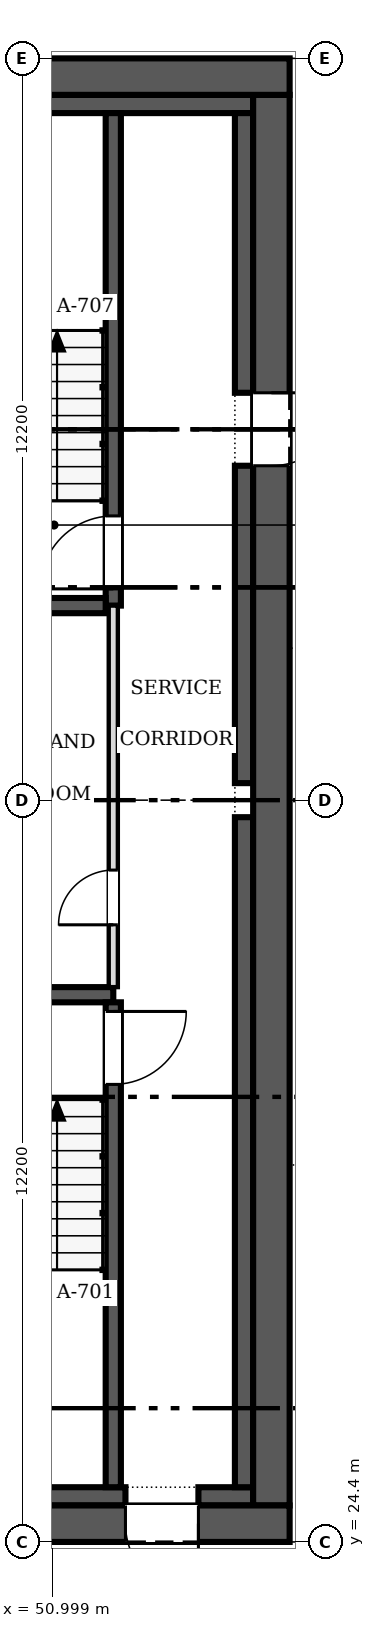
"""IFC4 building model, lengths in metres.
Left out: names, types, materials, properties, quantities, classifications, styles, units other than length and angle.
Written with IfcOpenShell. Run it as: python <this file> out.ifc"""

import sys

from ifc_helpers import new_model, si_unit, direction, frame, frame_2d, origin, place, context, subcontext, project, spatial, rectangle, extrude, source, transform, mapped, element, fill, save


model = new_model("IFC4")
c1 = context("Model", 3, precision=1e-05, world=origin(), true_north=direction((0.0, 1.0)))
c2 = subcontext(c1, "Body", "Model", "MODEL_VIEW")
j1 = project(units=[si_unit("LENGTHUNIT", "METRE"), si_unit("PLANEANGLEUNIT", "RADIAN")], contexts=[c1])
p1 = place(None, origin())
s1 = spatial("IfcSite", under=j1, at=p1, CompositionType="ELEMENT")
p2 = place(p1, origin())
s2 = spatial("IfcBuilding", under=s1, at=p2, CompositionType="ELEMENT")
p3 = place(p2, frame((0.0, 0.0, 189.6)))
s3 = spatial("IfcBuildingStorey", under=s2, at=p3, CompositionType="ELEMENT", Elevation=189.6)
p4 = place(p3, frame((54.9, 24.7, 0.0), z_axis=(0.0, 0.0, 1.0), x_axis=(-1.0, 0.0, 0.0)))
e1 = element("IfcWall", 1, at=p4, inside=s3, PredefinedType="SHEAR", context=c2, shape_type="SweptSolid", body=[
    extrude(rectangle(XDim=24.4, YDim=0.6, at=frame_2d((12.2, 0.0))), origin(), (0.0, 0.0, 1.0), 3.8),
])
m1 = source(origin(), c2, "Body", "SweptSolid", [
    extrude(rectangle(XDim=1.2, YDim=2.1, at=frame_2d((0.6, 1.05))), frame((0.0, 0.31, 0.0), z_axis=(0.0, -1.0, 0.0), x_axis=(1.0, 0.0, 0.0)), (0.0, 0.0, 1.0), 0.62),
])
p5 = place(p4, frame((1.5, 0.0, 0.0)))
e2 = element("IfcOpeningElement", 2, at=p5, cuts=e1, PredefinedType="OPENING", context=c2, shape_type="MappedRepresentation", body=[
    mapped(m1, transform((0.0, 0.0, 0.0), scale=1.0)),
])
p6 = place(p3, frame((30.5, 48.5, 0.0), z_axis=(0.0, 0.0, 1.0), x_axis=(1.0, 0.0, 0.0)))
e3 = element("IfcWall", 3, at=p6, inside=s3, PredefinedType="SHEAR", context=c2, shape_type="SweptSolid", body=[
    extrude(rectangle(XDim=24.4, YDim=0.6, at=frame_2d((12.2, 0.0))), origin(), (0.0, 0.0, 1.0), 3.8),
])
p7 = place(p3, frame((54.6, 48.2, 0.0), z_axis=(0.0, 0.0, 1.0), x_axis=(0.0, -1.0, 0.0)))
e4 = element("IfcWall", 4, at=p7, inside=s3, PredefinedType="SHEAR", context=c2, shape_type="SweptSolid", body=[
    extrude(rectangle(XDim=23.2, YDim=0.6, at=frame_2d((11.6, 0.0))), origin(), (0.0, 0.0, 1.0), 3.8),
])
p8 = place(p7, frame((4.9, 0.0, 0.0)))
e5 = element("IfcOpeningElement", 5, at=p8, cuts=e4, PredefinedType="OPENING", context=c2, shape_type="MappedRepresentation", body=[
    mapped(m1, transform((0.0, 0.0, 0.0), scale=1.0)),
])
p9 = place(p3, frame((31.1, 25.15, 0.0), z_axis=(0.0, 0.0, 1.0), x_axis=(1.0, 0.0, 0.0)))
e6 = element("IfcWall", 6, at=p9, inside=s3, PredefinedType="SOLIDWALL", context=c2, shape_type="SweptSolid", body=[
    extrude(rectangle(XDim=21.1, YDim=0.3, at=frame_2d((10.55, 0.0))), origin(), (0.0, 0.0, 1.0), 3.8),
])
p10 = place(p3, frame((53.4, 25.15, 0.0), z_axis=(0.0, 0.0, 1.0), x_axis=(1.0, 0.0, 0.0)))
e7 = element("IfcWall", 7, at=p10, inside=s3, PredefinedType="SOLIDWALL", context=c2, shape_type="SweptSolid", body=[
    extrude(rectangle(XDim=0.9, YDim=0.3, at=frame_2d((0.45, 0.0))), origin(), (0.0, 0.0, 1.0), 3.8),
])
p11 = place(p3, frame((31.1, 48.05, 0.0), z_axis=(0.0, 0.0, 1.0), x_axis=(1.0, 0.0, 0.0)))
e8 = element("IfcWall", 8, at=p11, inside=s3, PredefinedType="SOLIDWALL", context=c2, shape_type="SweptSolid", body=[
    extrude(rectangle(XDim=23.2, YDim=0.3, at=frame_2d((11.6, 0.0))), origin(), (0.0, 0.0, 1.0), 3.8),
])
p12 = place(p3, frame((54.15, 25.3, 0.0), z_axis=(0.0, 0.0, 1.0), x_axis=(0.0, 1.0, 0.0)))
e9 = element("IfcWall", 9, at=p12, inside=s3, PredefinedType="SOLIDWALL", context=c2, shape_type="SweptSolid", body=[
    extrude(rectangle(XDim=11.02, YDim=0.3, at=frame_2d((5.51, 0.0))), origin(), (0.0, 0.0, 1.0), 3.8),
])
p13 = place(p3, frame((54.15, 36.88, 0.0), z_axis=(0.0, 0.0, 1.0), x_axis=(0.0, 1.0, 0.0)))
e10 = element("IfcWall", 10, at=p13, inside=s3, PredefinedType="SOLIDWALL", context=c2, shape_type="SweptSolid", body=[
    extrude(rectangle(XDim=5.22, YDim=0.3, at=frame_2d((2.61, 0.0))), origin(), (0.0, 0.0, 1.0), 3.8),
])
p14 = place(p3, frame((54.15, 43.3, 0.0), z_axis=(0.0, 0.0, 1.0), x_axis=(0.0, 1.0, 0.0)))
e11 = element("IfcWall", 11, at=p14, inside=s3, PredefinedType="SOLIDWALL", context=c2, shape_type="SweptSolid", body=[
    extrude(rectangle(XDim=4.6, YDim=0.3, at=frame_2d((2.3, 0.0))), origin(), (0.0, 0.0, 1.0), 3.8),
])
p15 = place(p3, frame((48.475, 33.4, 0.0), z_axis=(0.0, 0.0, 1.0), x_axis=(1.0, 0.0, 0.0)))
e12 = element("IfcWall", 12, at=p15, inside=s3, PredefinedType="SOLIDWALL", context=c2, shape_type="SweptSolid", body=[
    extrude(rectangle(XDim=3.525, YDim=0.25, at=frame_2d((1.762, 0.0))), origin(), (0.0, 0.0, 1.0), 3.8),
])
p16 = place(p3, frame((52.0, 25.3, 0.0), z_axis=(0.0, 0.0, 1.0), x_axis=(0.0, 1.0, 0.0)))
e13 = element("IfcWall", 13, at=p16, inside=s3, PredefinedType="SOLIDWALL", context=c2, shape_type="SweptSolid", body=[
    extrude(rectangle(XDim=7.975, YDim=0.25, at=frame_2d((3.987, 0.0))), origin(), (0.0, 0.0, 1.0), 3.8),
])
m2 = source(origin(), c2, "Body", "SweptSolid", [
    extrude(rectangle(XDim=1.2, YDim=2.1, at=frame_2d((0.6, 1.05))), frame((0.0, 0.135, 0.0), z_axis=(0.0, -1.0, 0.0), x_axis=(1.0, 0.0, 0.0)), (0.0, 0.0, 1.0), 0.27),
])
p17 = place(p16, frame((6.625, 0.0, 0.0)))
e14 = element("IfcOpeningElement", 14, at=p17, cuts=e13, PredefinedType="OPENING", context=c2, shape_type="MappedRepresentation", body=[
    mapped(m2, transform((0.0, 0.0, 0.0), scale=1.0)),
])
p18 = place(p3, frame((52.0, 39.8, 0.0), z_axis=(0.0, 0.0, 1.0), x_axis=(0.0, 1.0, 0.0)))
e15 = element("IfcWall", 15, at=p18, inside=s3, PredefinedType="SOLIDWALL", context=c2, shape_type="SweptSolid", body=[
    extrude(rectangle(XDim=8.1, YDim=0.25, at=frame_2d((4.05, 0.0))), origin(), (0.0, 0.0, 1.0), 3.8),
])
p19 = place(p18, frame((0.275, 0.0, 0.0)))
e16 = element("IfcOpeningElement", 16, at=p19, cuts=e15, PredefinedType="OPENING", context=c2, shape_type="MappedRepresentation", body=[
    mapped(m2, transform((0.0, 0.0, 0.0), scale=1.0)),
])
p20 = place(p3, frame((48.475, 39.8, 0.0), z_axis=(0.0, 0.0, 1.0), x_axis=(1.0, 0.0, 0.0)))
e17 = element("IfcWall", 17, at=p20, inside=s3, PredefinedType="SOLIDWALL", context=c2, shape_type="SweptSolid", body=[
    extrude(rectangle(XDim=3.4, YDim=0.25, at=frame_2d((1.7, 0.0))), origin(), (0.0, 0.0, 1.0), 3.8),
])
p21 = place(p3, frame((52.0, 33.525, 0.0), z_axis=(0.0, 0.0, 1.0), x_axis=(0.0, 1.0, 0.0)))
e18 = element("IfcWall", 18, at=p21, inside=s3, PredefinedType="PARTITIONING", context=c2, shape_type="SweptSolid", body=[
    extrude(rectangle(XDim=6.275, YDim=0.15, at=frame_2d((3.138, 0.0))), origin(), (0.0, 0.0, 1.0), 3.55),
])
m3 = source(origin(), c2, "Body", "SweptSolid", [
    extrude(rectangle(XDim=0.9, YDim=2.1, at=frame_2d((0.45, 1.05))), frame((0.0, 0.085, 0.0), z_axis=(0.0, -1.0, 0.0), x_axis=(1.0, 0.0, 0.0)), (0.0, 0.0, 1.0), 0.17),
])
p22 = place(p21, frame((1.025, 0.0, 0.0)))
e19 = element("IfcOpeningElement", 19, at=p22, cuts=e18, PredefinedType="OPENING", context=c2, shape_type="MappedRepresentation", body=[
    mapped(m3, transform((0.0, 0.0, 0.0), scale=1.0)),
])
m4 = source(origin(), c2, "Body", "SweptSolid", [
    extrude(rectangle(XDim=1.2, YDim=2.1, at=frame_2d((0.6, 1.05))), frame((0.0, 0.025, 0.0), z_axis=(0.0, -1.0, 0.0), x_axis=(1.0, 0.0, 0.0)), (0.0, 0.0, 1.0), 0.05),
])
p23 = place(p5, origin())
e20 = element("IfcDoor", 20, at=p23, inside=s3, OperationType="SINGLE_SWING_LEFT", PredefinedType="DOOR", context=c2, shape_type="MappedRepresentation", body=[
    mapped(m4, transform((0.0, 0.0, 0.0), scale=1.0)),
])
fill(e2, e20)
p24 = place(p8, origin())
e21 = element("IfcDoor", 21, at=p24, inside=s3, OperationType="SINGLE_SWING_LEFT", PredefinedType="DOOR", context=c2, shape_type="MappedRepresentation", body=[
    mapped(m4, transform((0.0, 0.0, 0.0), scale=1.0)),
])
fill(e5, e21)
p25 = place(p17, origin())
e22 = element("IfcDoor", 22, at=p25, inside=s3, OperationType="SINGLE_SWING_RIGHT", PredefinedType="DOOR", context=c2, shape_type="MappedRepresentation", body=[
    mapped(m4, transform((0.0, 0.0, 0.0), scale=1.0)),
])
fill(e14, e22)
p26 = place(p19, origin())
e23 = element("IfcDoor", 23, at=p26, inside=s3, OperationType="SINGLE_SWING_LEFT", PredefinedType="DOOR", context=c2, shape_type="MappedRepresentation", body=[
    mapped(m4, transform((0.0, 0.0, 0.0), scale=1.0)),
])
fill(e16, e23)
m5 = source(origin(), c2, "Body", "SweptSolid", [
    extrude(rectangle(XDim=0.9, YDim=2.1, at=frame_2d((0.45, 1.05))), frame((0.0, 0.025, 0.0), z_axis=(0.0, -1.0, 0.0), x_axis=(1.0, 0.0, 0.0)), (0.0, 0.0, 1.0), 0.05),
])
p27 = place(p22, origin())
e24 = element("IfcDoor", 24, at=p27, inside=s3, OperationType="SINGLE_SWING_LEFT", PredefinedType="DOOR", context=c2, shape_type="MappedRepresentation", body=[
    mapped(m5, transform((0.0, 0.0, 0.0), scale=1.0)),
])
fill(e19, e24)
save(model, sys.argv[1])
